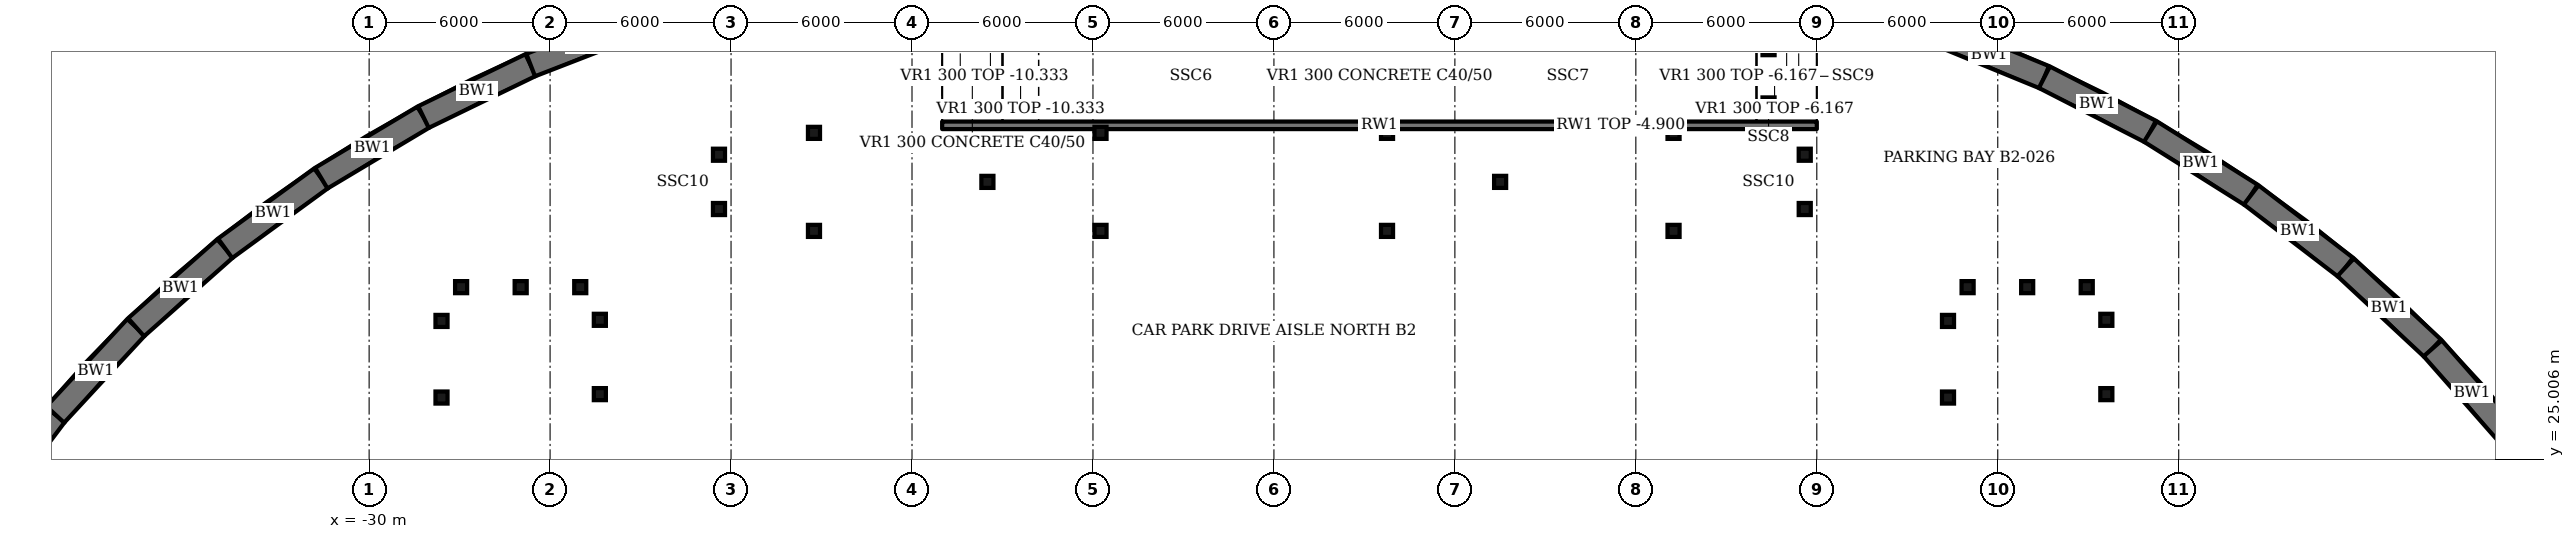
"""IFC4 building model, lengths in metres.
Left out: names, types, materials, properties, quantities, classifications, styles, units other than length and angle.
Written with IfcOpenShell. Run it as: python <this file> out.ifc"""

import sys

from ifc_helpers import new_model, si_unit, direction, frame, frame_2d, origin, origin_2d, place, context, subcontext, project, spatial, polyline, rectangle, outline, extrude, element, save


model = new_model("IFC4")
c1 = context("Model", 3, precision=1e-05, world=origin(), true_north=direction((0.0, 1.0)))
c2 = subcontext(c1, "Body", "Model", "MODEL_VIEW")
j1 = project(units=[si_unit("LENGTHUNIT", "METRE"), si_unit("PLANEANGLEUNIT", "RADIAN")], contexts=[c1])
p1 = place(None, origin())
s1 = spatial("IfcSite", under=j1, at=p1, CompositionType="ELEMENT")
p2 = place(p1, origin())
s2 = spatial("IfcBuilding", under=s1, at=p2, CompositionType="ELEMENT")
p3 = place(p2, frame((0.0, 0.0, -10.5)))
s3 = spatial("IfcBuildingStorey", under=s2, at=p3, CompositionType="ELEMENT", Elevation=-10.5)
p4 = place(p3, frame((-42.778, 23.338, 0.0), z_axis=(0.0, 0.0, 1.0), x_axis=(0.601930372291, 0.798548575175, 0.0)))
e1 = element("IfcWall", 1, at=p4, inside=s3, PredefinedType="SOLIDWALL", context=c2, shape_type="SweptSolid", body=[
    extrude(rectangle(XDim=3.942, YDim=0.8, at=frame_2d((1.971, 0.0))), origin(), (0.0, 0.0, 1.0), 4.5),
])
p5 = place(p3, frame((-40.405, 26.486, 0.0), z_axis=(0.0, 0.0, 1.0), x_axis=(0.679341363133, 0.733822398361, 0.0)))
e2 = element("IfcWall", 2, at=p5, inside=s3, PredefinedType="SOLIDWALL", context=c2, shape_type="SweptSolid", body=[
    extrude(rectangle(XDim=3.943, YDim=0.8, at=frame_2d((1.972, 0.0))), origin(), (0.0, 0.0, 1.0), 4.5),
])
p6 = place(p3, frame((-37.726, 29.38, 0.0), z_axis=(0.0, 0.0, 1.0), x_axis=(0.748282708278, 0.663379972936, 0.0)))
e3 = element("IfcWall", 3, at=p6, inside=s3, PredefinedType="SOLIDWALL", context=c2, shape_type="SweptSolid", body=[
    extrude(rectangle(XDim=3.945, YDim=0.8, at=frame_2d((1.973, 0.0))), origin(), (0.0, 0.0, 1.0), 4.5),
])
p7 = place(p3, frame((-34.774, 31.997, 0.0), z_axis=(0.0, 0.0, 1.0), x_axis=(0.807844288367, 0.589395966861, 0.0)))
e4 = element("IfcWall", 4, at=p7, inside=s3, PredefinedType="SOLIDWALL", context=c2, shape_type="SweptSolid", body=[
    extrude(rectangle(XDim=3.946, YDim=0.8, at=frame_2d((1.973, 0.0))), origin(), (0.0, 0.0, 1.0), 4.5),
])
p8 = place(p3, frame((-31.586, 34.323, 0.0), z_axis=(0.0, 0.0, 1.0), x_axis=(0.858234183213, 0.513258304135, 0.0)))
e5 = element("IfcWall", 5, at=p8, inside=s3, PredefinedType="SOLIDWALL", context=c2, shape_type="SweptSolid", body=[
    extrude(rectangle(XDim=3.948, YDim=0.8, at=frame_2d((1.974, 0.0))), origin(), (0.0, 0.0, 1.0), 4.5),
])
p9 = place(p3, frame((-28.198, 36.349, 0.0), z_axis=(0.0, 0.0, 1.0), x_axis=(0.899739832589, 0.436426664691, 0.0)))
e6 = element("IfcWall", 6, at=p9, inside=s3, PredefinedType="SOLIDWALL", context=c2, shape_type="SweptSolid", body=[
    extrude(rectangle(XDim=3.95, YDim=0.8, at=frame_2d((1.975, 0.0))), origin(), (0.0, 0.0, 1.0), 4.5),
])
p10 = place(p3, frame((-24.644, 38.073, 0.0), z_axis=(0.0, 0.0, 1.0), x_axis=(0.932555353047, 0.361027026001, 0.0)))
e7 = element("IfcWall", 7, at=p10, inside=s3, PredefinedType="SOLIDWALL", context=c2, shape_type="SweptSolid", body=[
    extrude(rectangle(XDim=3.953, YDim=0.8, at=frame_2d((1.976, 0.0))), origin(), (0.0, 0.0, 1.0), 4.5),
])
p11 = place(p3, frame((21.891, 39.171, 0.0), z_axis=(0.0, 0.0, 1.0), x_axis=(0.925028349338, -0.37989808228, 0.0)))
e8 = element("IfcWall", 8, at=p11, inside=s3, PredefinedType="SOLIDWALL", context=c2, shape_type="SweptSolid", body=[
    extrude(rectangle(XDim=3.951, YDim=0.8, at=frame_2d((1.976, 0.0))), origin(), (0.0, 0.0, 1.0), 4.5),
])
p12 = place(p3, frame((25.546, 37.67, 0.0), z_axis=(0.0, 0.0, 1.0), x_axis=(0.890108207411, -0.455749250246, 0.0)))
e9 = element("IfcWall", 9, at=p12, inside=s3, PredefinedType="SOLIDWALL", context=c2, shape_type="SweptSolid", body=[
    extrude(rectangle(XDim=3.949, YDim=0.8, at=frame_2d((1.975, 0.0))), origin(), (0.0, 0.0, 1.0), 4.5),
])
p13 = place(p3, frame((29.061, 35.87, 0.0), z_axis=(0.0, 0.0, 1.0), x_axis=(0.846595147824, -0.532237405375, 0.0)))
e10 = element("IfcWall", 10, at=p13, inside=s3, PredefinedType="SOLIDWALL", context=c2, shape_type="SweptSolid", body=[
    extrude(rectangle(XDim=3.948, YDim=0.8, at=frame_2d((1.974, 0.0))), origin(), (0.0, 0.0, 1.0), 4.5),
])
p14 = place(p3, frame((32.403, 33.769, 0.0), z_axis=(0.0, 0.0, 1.0), x_axis=(0.793719876986, -0.608283451096, 0.0)))
e11 = element("IfcWall", 11, at=p14, inside=s3, PredefinedType="SOLIDWALL", context=c2, shape_type="SweptSolid", body=[
    extrude(rectangle(XDim=3.946, YDim=0.8, at=frame_2d((1.973, 0.0))), origin(), (0.0, 0.0, 1.0), 4.5),
])
p15 = place(p3, frame((35.535, 31.369, 0.0), z_axis=(0.0, 0.0, 1.0), x_axis=(0.732030218805, -0.68127216203, 0.0)))
e12 = element("IfcWall", 12, at=p15, inside=s3, PredefinedType="SOLIDWALL", context=c2, shape_type="SweptSolid", body=[
    extrude(rectangle(XDim=3.944, YDim=0.8, at=frame_2d((1.972, 0.0))), origin(), (0.0, 0.0, 1.0), 4.5),
])
p16 = place(p3, frame((38.422, 28.682, 0.0), z_axis=(0.0, 0.0, 1.0), x_axis=(0.660798136834, -0.750563669756, 0.0)))
e13 = element("IfcWall", 13, at=p16, inside=s3, PredefinedType="SOLIDWALL", context=c2, shape_type="SweptSolid", body=[
    extrude(rectangle(XDim=3.944, YDim=0.8, at=frame_2d((1.972, 0.0))), origin(), (0.0, 0.0, 1.0), 4.5),
])
p17 = place(p3, frame((-11.0, 36.075, 0.0), z_axis=(0.0, 0.0, 1.0), x_axis=(1.0, 0.0, 0.0)))
e14 = element("IfcWall", 14, at=p17, inside=s3, PredefinedType="SOLIDWALL", context=c2, shape_type="SweptSolid", body=[
    extrude(outline(polyline([(0.0, 0.0), (29.0, 0.0), (29.0, 5.6), (27.0, 5.433), (2.0, 1.267), (0.0, 1.1), (0.0, 0.0)])), frame((0.0, 0.125, 0.0), z_axis=(0.0, -1.0, 0.0), x_axis=(1.0, 0.0, 0.0)), (0.0, 0.0, 1.0), 0.25),
])
for number, where, z_axis, x_axis in (
    (15, (13.25, 35.825, 0.0), (0.0, 0.0, 1.0), (1.0, 0.0, 0.0)),
    (16, (3.75, 35.825, 0.0), (0.0, 0.0, 1.0), (1.0, 0.0, 0.0)),
    (17, (-5.75, 35.825, 0.0), (0.0, 0.0, 1.0), (1.0, 0.0, 0.0)),
    (18, (-15.25, 35.825, 0.0), (0.0, 0.0, 1.0), (1.0, 0.0, 0.0)),
    (19, (13.25, 32.575, 0.0), (0.0, 0.0, 1.0), (1.0, 0.0, 0.0)),
    (20, (3.75, 32.575, 0.0), (0.0, 0.0, 1.0), (1.0, 0.0, 0.0)),
    (21, (-5.75, 32.575, 0.0), (0.0, 0.0, 1.0), (1.0, 0.0, 0.0)),
    (22, (-15.25, 32.575, 0.0), (0.0, 0.0, 1.0), (1.0, 0.0, 0.0)),
    (23, (17.6, 35.1, 0.0), (0.0, 0.0, 1.0), (1.0, 0.0, 0.0)),
    (24, (17.6, 33.3, 0.0), (0.0, 0.0, 1.0), (1.0, 0.0, 0.0)),
    (25, (7.5, 34.2, 0.0), (0.0, 0.0, 1.0), (1.0, 0.0, 0.0)),
    (26, (-9.5, 34.2, 0.0), (0.0, 0.0, 1.0), (1.0, 0.0, 0.0)),
    (27, (-18.4, 35.1, 0.0), (0.0, 0.0, 1.0), (1.0, 0.0, 0.0)),
    (28, (-18.4, 33.3, 0.0), (0.0, 0.0, 1.0), (1.0, 0.0, 0.0)),
    (29, (-27.6, 29.59, 0.0), (0.0, 0.0, 1.0), (1.0, 0.0, 0.0)),
    (30, (-27.6, 27.05, 0.0), (0.0, 0.0, 1.0), (1.0, 0.0, 0.0)),
    (31, (-22.35, 27.163, 0.0), (0.0, 0.0, 1.0), (1.0, 0.0, 0.0)),
    (32, (-22.35, 29.627, 0.0), (0.0, 0.0, 1.0), (1.0, 0.0, 0.0)),
    (33, (22.35, 29.59, 0.0), (0.0, 0.0, 1.0), (1.0, 0.0, 0.0)),
    (34, (22.35, 27.05, 0.0), (0.0, 0.0, 1.0), (1.0, 0.0, 0.0)),
    (35, (27.6, 27.163, 0.0), (0.0, 0.0, 1.0), (1.0, 0.0, 0.0)),
    (36, (27.6, 29.627, 0.0), (0.0, 0.0, 1.0), (1.0, 0.0, 0.0)),
    (37, (-26.95, 30.71, 0.0), (0.0, 0.0, 1.0), (1.0, 0.0, 0.0)),
    (38, (-23.0, 30.71, 0.0), (0.0, 0.0, 1.0), (1.0, 0.0, 0.0)),
    (39, (-24.975, 30.71, 0.0), (0.0, 0.0, 1.0), (1.0, 0.0, 0.0)),
    (40, (23.0, 30.71, 0.0), (0.0, 0.0, 1.0), (1.0, 0.0, 0.0)),
    (41, (26.95, 30.71, 0.0), (0.0, 0.0, 1.0), (1.0, 0.0, 0.0)),
    (42, (24.975, 30.71, 0.0), (0.0, 0.0, 1.0), (1.0, 0.0, 0.0)),
):
    element("IfcColumn", number, at=place(p3, frame(where, z_axis=z_axis, x_axis=x_axis)), inside=s3, PredefinedType="COLUMN", context=c2, shape_type="SweptSolid", body=[
        extrude(rectangle(XDim=0.4, YDim=0.4, at=origin_2d()), origin(), (0.0, 0.0, 1.0), 4.5),
    ])
p18 = place(p3, frame((-2.75, 37.7, 0.0), z_axis=(0.0, 0.0, 1.0), x_axis=(1.0, 0.0, 0.0)))
e43 = element("IfcColumn", 43, at=p18, inside=s3, PredefinedType="COLUMN", context=c2, shape_type="SweptSolid", body=[
    extrude(rectangle(XDim=0.4, YDim=0.4, at=origin_2d()), origin(), (0.0, 0.0, 1.0), 0.905),
])
p19 = place(p3, frame((9.75, 37.7, 0.0), z_axis=(0.0, 0.0, 1.0), x_axis=(1.0, 0.0, 0.0)))
e44 = element("IfcColumn", 44, at=p19, inside=s3, PredefinedType="COLUMN", context=c2, shape_type="SweptSolid", body=[
    extrude(rectangle(XDim=0.4, YDim=0.4, at=origin_2d()), origin(), (0.0, 0.0, 1.0), 2.989),
])
for number, where, z_axis, x_axis in (
    (45, (16.4, 36.8, 0.0), (0.0, 0.0, 1.0), (1.0, 0.0, 0.0)),
    (46, (16.4, 38.6, 0.0), (0.0, 0.0, 1.0), (1.0, 0.0, 0.0)),
):
    element("IfcColumn", number, at=place(p3, frame(where, z_axis=z_axis, x_axis=x_axis)), inside=s3, PredefinedType="COLUMN", context=c2, shape_type="SweptSolid", body=[
        extrude(rectangle(XDim=0.4, YDim=0.4, at=origin_2d()), origin(), (0.0, 0.0, 1.0), 4.064),
    ])
p20 = place(p3, frame((17.6, 37.7, 0.0), z_axis=(0.0, 0.0, 1.0), x_axis=(1.0, 0.0, 0.0)))
e47 = element("IfcColumn", 47, at=p20, inside=s3, PredefinedType="COLUMN", context=c2, shape_type="SweptSolid", body=[
    extrude(rectangle(XDim=0.5, YDim=0.5, at=origin_2d()), origin(), (0.0, 0.0, 1.0), 4.164),
])
for number, where, z_axis, x_axis in (
    (48, (16.4, 34.2, 0.0), (0.0, 0.0, 1.0), (1.0, 0.0, 0.0)),
    (49, (-19.6, 34.2, 0.0), (0.0, 0.0, 1.0), (1.0, 0.0, 0.0)),
):
    element("IfcColumn", number, at=place(p3, frame(where, z_axis=z_axis, x_axis=x_axis)), inside=s3, PredefinedType="COLUMN", context=c2, shape_type="SweptSolid", body=[
        extrude(rectangle(XDim=0.5, YDim=0.5, at=origin_2d()), origin(), (0.0, 0.0, 1.0), 4.5),
    ])
save(model, sys.argv[1])
